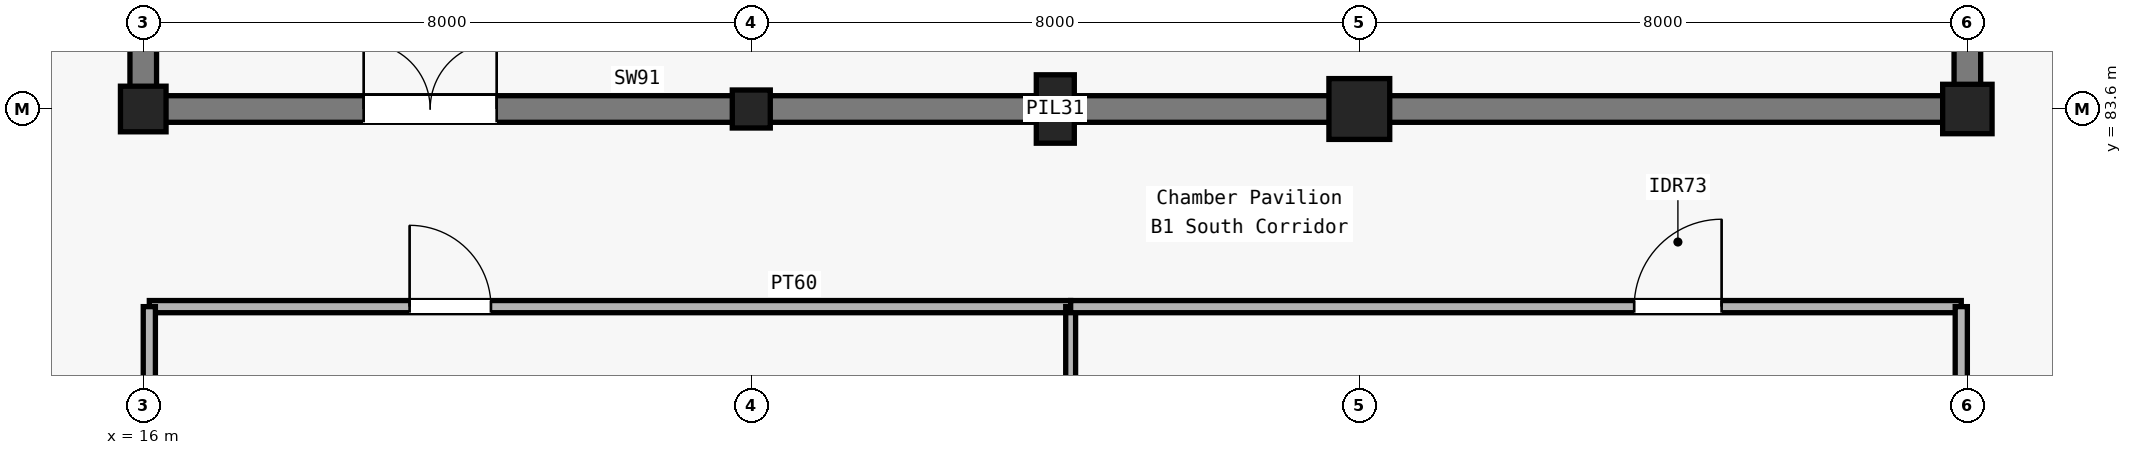
"""IFC4 building model, lengths in metres.
Left out: names, types, materials, properties, quantities, classifications, styles, units other than length and angle.
Written with IfcOpenShell. Run it as: python <this file> out.ifc"""

import sys

from ifc_helpers import new_model, si_unit, direction, frame, frame_2d, origin, origin_2d, place, context, subcontext, project, spatial, rectangle, circle, extrude, element, fill, save


model = new_model("IFC4")
c1 = context("Model", 3, precision=1e-05, world=origin(), true_north=direction((0.0, 1.0)))
c2 = subcontext(c1, "Body", "Model", "MODEL_VIEW")
j1 = project(units=[si_unit("LENGTHUNIT", "METRE"), si_unit("PLANEANGLEUNIT", "RADIAN")], contexts=[c1])
p1 = place(None, origin())
s1 = spatial("IfcSite", under=j1, at=p1, CompositionType="ELEMENT")
p2 = place(p1, origin())
s2 = spatial("IfcBuilding", under=s1, at=p2, CompositionType="ELEMENT")
p3 = place(p2, frame((0.0, 0.0, -5.4)))
s3 = spatial("IfcBuildingStorey", under=s2, at=p3, CompositionType="ELEMENT", Elevation=-5.4)
p4 = place(p3, frame((16.0, 83.6, 0.0), z_axis=(0.0, 0.0, 1.0), x_axis=(1.0, 0.0, 0.0)))
e1 = element("IfcColumn", 1, at=p4, inside=s3, PredefinedType="COLUMN", context=c2, shape_type="SweptSolid", body=[
    extrude(rectangle(XDim=0.6, YDim=0.6, at=origin_2d()), origin(), (0.0, 0.0, 1.0), 5.4),
])
p5 = place(p3, frame((24.0, 83.6, 0.0), z_axis=(0.0, 0.0, 1.0), x_axis=(1.0, 0.0, 0.0)))
e2 = element("IfcColumn", 2, at=p5, inside=s3, PredefinedType="COLUMN", context=c2, shape_type="SweptSolid", body=[
    extrude(rectangle(XDim=0.5, YDim=0.5, at=origin_2d()), origin(), (0.0, 0.0, 1.0), 5.4),
])
p6 = place(p3, frame((32.0, 83.6, 0.0), z_axis=(0.0, 0.0, 1.0), x_axis=(1.0, 0.0, 0.0)))
e3 = element("IfcColumn", 3, at=p6, inside=s3, PredefinedType="COLUMN", context=c2, shape_type="SweptSolid", body=[
    extrude(circle(Radius=0.4, at=origin_2d()), origin(), (0.0, 0.0, 1.0), 5.4),
])
p7 = place(p3, frame((40.0, 83.6, 0.0), z_axis=(0.0, 0.0, 1.0), x_axis=(1.0, 0.0, 0.0)))
e4 = element("IfcColumn", 4, at=p7, inside=s3, PredefinedType="COLUMN", context=c2, shape_type="SweptSolid", body=[
    extrude(circle(Radius=0.325, at=origin_2d()), origin(), (0.0, 0.0, 1.0), 5.4),
])
p8 = place(p3, frame((28.0, 83.6, 0.0), z_axis=(0.0, 0.0, 1.0), x_axis=(1.0, 0.0, 0.0)))
e5 = element("IfcColumn", 5, at=p8, inside=s3, PredefinedType="PILASTER", context=c2, shape_type="SweptSolid", body=[
    extrude(rectangle(XDim=0.5, YDim=0.9, at=origin_2d()), origin(), (0.0, 0.0, 1.0), 5.4),
])
p9 = place(p3, frame((16.0, 83.6, 0.0), z_axis=(0.0, 0.0, 1.0), x_axis=(1.0, 0.0, 0.0)))
e6 = element("IfcWall", 6, at=p9, inside=s3, PredefinedType="SHEAR", context=c2, shape_type="SweptSolid", body=[
    extrude(rectangle(XDim=8.0, YDim=0.35, at=frame_2d((4.0, 0.0))), origin(), (0.0, 0.0, 1.0), 5.08),
])
p10 = place(p9, frame((2.9, 0.0, 0.0)))
e7 = element("IfcOpeningElement", 7, at=p10, cuts=e6, PredefinedType="OPENING", context=c2, shape_type="SweptSolid", body=[
    extrude(rectangle(XDim=1.75, YDim=2.25, at=frame_2d((0.875, 1.125))), frame((0.0, 0.185, 0.0), z_axis=(0.0, -1.0, 0.0), x_axis=(1.0, 0.0, 0.0)), (0.0, 0.0, 1.0), 0.37),
])
for number, where, z_axis, x_axis in (
    (8, (24.0, 83.6, 0.0), (0.0, 0.0, 1.0), (1.0, 0.0, 0.0)),
    (9, (32.0, 83.6, 0.0), (0.0, 0.0, 1.0), (1.0, 0.0, 0.0)),
):
    element("IfcWall", number, at=place(p3, frame(where, z_axis=z_axis, x_axis=x_axis)), inside=s3, PredefinedType="SHEAR", context=c2, shape_type="SweptSolid", body=[
        extrude(rectangle(XDim=8.0, YDim=0.35, at=frame_2d((4.0, 0.0))), origin(), (0.0, 0.0, 1.0), 5.08),
    ])
p11 = place(p3, frame((16.0, 83.6, 0.0), z_axis=(0.0, 0.0, 1.0), x_axis=(0.0, 1.0, 0.0)))
e10 = element("IfcWall", 10, at=p11, inside=s3, PredefinedType="SHEAR", context=c2, shape_type="SweptSolid", body=[
    extrude(rectangle(XDim=7.6, YDim=0.35, at=frame_2d((3.8, 0.0))), origin(), (0.0, 0.0, 1.0), 5.08),
])
p12 = place(p11, frame((2.9, 0.0, 0.0)))
e11 = element("IfcOpeningElement", 11, at=p12, cuts=e10, PredefinedType="OPENING", context=c2, shape_type="SweptSolid", body=[
    extrude(rectangle(XDim=1.75, YDim=2.25, at=frame_2d((0.875, 1.125))), frame((0.0, 0.185, 0.0), z_axis=(0.0, -1.0, 0.0), x_axis=(1.0, 0.0, 0.0)), (0.0, 0.0, 1.0), 0.37),
])
p13 = place(p3, frame((40.0, 83.6, 0.0), z_axis=(0.0, 0.0, 1.0), x_axis=(0.0, 1.0, 0.0)))
e12 = element("IfcWall", 12, at=p13, inside=s3, PredefinedType="SHEAR", context=c2, shape_type="SweptSolid", body=[
    extrude(rectangle(XDim=7.6, YDim=0.35, at=frame_2d((3.8, 0.0))), origin(), (0.0, 0.0, 1.0), 5.08),
])
p14 = place(p13, frame((2.9, 0.0, 0.0)))
e13 = element("IfcOpeningElement", 13, at=p14, cuts=e12, PredefinedType="OPENING", context=c2, shape_type="SweptSolid", body=[
    extrude(rectangle(XDim=1.75, YDim=2.25, at=frame_2d((0.875, 1.125))), frame((0.0, 0.185, 0.0), z_axis=(0.0, -1.0, 0.0), x_axis=(1.0, 0.0, 0.0)), (0.0, 0.0, 1.0), 0.37),
])
p15 = place(p3, frame((16.08, 81.0, 0.0), z_axis=(0.0, 0.0, 1.0), x_axis=(1.0, 0.0, 0.0)))
e14 = element("IfcWall", 14, at=p15, inside=s3, PredefinedType="PARTITIONING", context=c2, shape_type="SweptSolid", body=[
    extrude(rectangle(XDim=12.122, YDim=0.16, at=frame_2d((6.061, 0.0))), origin(), (0.0, 0.0, 1.0), 4.305),
])
p16 = place(p15, frame((3.425, 0.0, 0.0)))
e15 = element("IfcOpeningElement", 15, at=p16, cuts=e14, PredefinedType="OPENING", context=c2, shape_type="SweptSolid", body=[
    extrude(rectangle(XDim=1.07, YDim=2.15, at=frame_2d((0.535, 1.075))), frame((0.0, 0.09, 0.0), z_axis=(0.0, -1.0, 0.0), x_axis=(1.0, 0.0, 0.0)), (0.0, 0.0, 1.0), 0.18),
])
p17 = place(p3, frame((28.202, 68.48, 0.0), z_axis=(0.0, 0.0, 1.0), x_axis=(0.0, 1.0, 0.0)))
e16 = element("IfcWall", 16, at=p17, inside=s3, PredefinedType="PARTITIONING", context=c2, shape_type="SweptSolid", body=[
    extrude(rectangle(XDim=12.52, YDim=0.13, at=frame_2d((6.26, 0.0))), origin(), (0.0, 0.0, 1.0), 4.155),
])
p18 = place(p3, frame((28.202, 81.0, 0.0), z_axis=(0.0, 0.0, 1.0), x_axis=(1.0, 0.0, 0.0)))
e17 = element("IfcWall", 17, at=p18, inside=s3, PredefinedType="PARTITIONING", context=c2, shape_type="SweptSolid", body=[
    extrude(rectangle(XDim=11.718, YDim=0.16, at=frame_2d((5.859, 0.0))), origin(), (0.0, 0.0, 1.0), 4.255),
])
p19 = place(p18, frame((7.415, 0.0, 0.0)))
e18 = element("IfcOpeningElement", 18, at=p19, cuts=e17, PredefinedType="OPENING", context=c2, shape_type="SweptSolid", body=[
    extrude(rectangle(XDim=1.15, YDim=2.15, at=frame_2d((0.575, 1.075))), frame((0.0, 0.09, 0.0), z_axis=(0.0, -1.0, 0.0), x_axis=(1.0, 0.0, 0.0)), (0.0, 0.0, 1.0), 0.18),
])
p20 = place(p3, frame((16.08, 68.85, 0.0), z_axis=(0.0, 0.0, 1.0), x_axis=(0.0, 1.0, 0.0)))
e19 = element("IfcWall", 19, at=p20, inside=s3, PredefinedType="PARTITIONING", context=c2, shape_type="SweptSolid", body=[
    extrude(rectangle(XDim=12.15, YDim=0.16, at=frame_2d((6.075, 0.0))), origin(), (0.0, 0.0, 1.0), 4.41),
])
p21 = place(p3, frame((39.92, 68.65, 0.0), z_axis=(0.0, 0.0, 1.0), x_axis=(0.0, 1.0, 0.0)))
e20 = element("IfcWall", 20, at=p21, inside=s3, PredefinedType="PARTITIONING", context=c2, shape_type="SweptSolid", body=[
    extrude(rectangle(XDim=12.35, YDim=0.16, at=frame_2d((6.175, 0.0))), origin(), (0.0, 0.0, 1.0), 4.255),
])
p22 = place(p16, origin())
e21 = element("IfcDoor", 21, at=p22, inside=s3, OperationType="SINGLE_SWING_LEFT", PredefinedType="DOOR", context=c2, shape_type="SweptSolid", body=[
    extrude(rectangle(XDim=1.07, YDim=2.15, at=frame_2d((0.535, 1.075))), frame((0.0, 0.025, 0.0), z_axis=(0.0, -1.0, 0.0), x_axis=(1.0, 0.0, 0.0)), (0.0, 0.0, 1.0), 0.05),
])
fill(e15, e21)
p23 = place(p19, origin())
e22 = element("IfcDoor", 22, at=p23, inside=s3, OperationType="SINGLE_SWING_RIGHT", PredefinedType="DOOR", context=c2, shape_type="SweptSolid", body=[
    extrude(rectangle(XDim=1.15, YDim=2.15, at=frame_2d((0.575, 1.075))), frame((0.0, 0.025, 0.0), z_axis=(0.0, -1.0, 0.0), x_axis=(1.0, 0.0, 0.0)), (0.0, 0.0, 1.0), 0.05),
])
fill(e18, e22)
p24 = place(p10, origin())
e23 = element("IfcDoor", 23, at=p24, inside=s3, OperationType="DOUBLE_DOOR_SINGLE_SWING", PredefinedType="DOOR", context=c2, shape_type="SweptSolid", body=[
    extrude(rectangle(XDim=1.75, YDim=2.25, at=frame_2d((0.875, 1.125))), frame((0.0, 0.025, 0.0), z_axis=(0.0, -1.0, 0.0), x_axis=(1.0, 0.0, 0.0)), (0.0, 0.0, 1.0), 0.05),
])
fill(e7, e23)
save(model, sys.argv[1])
